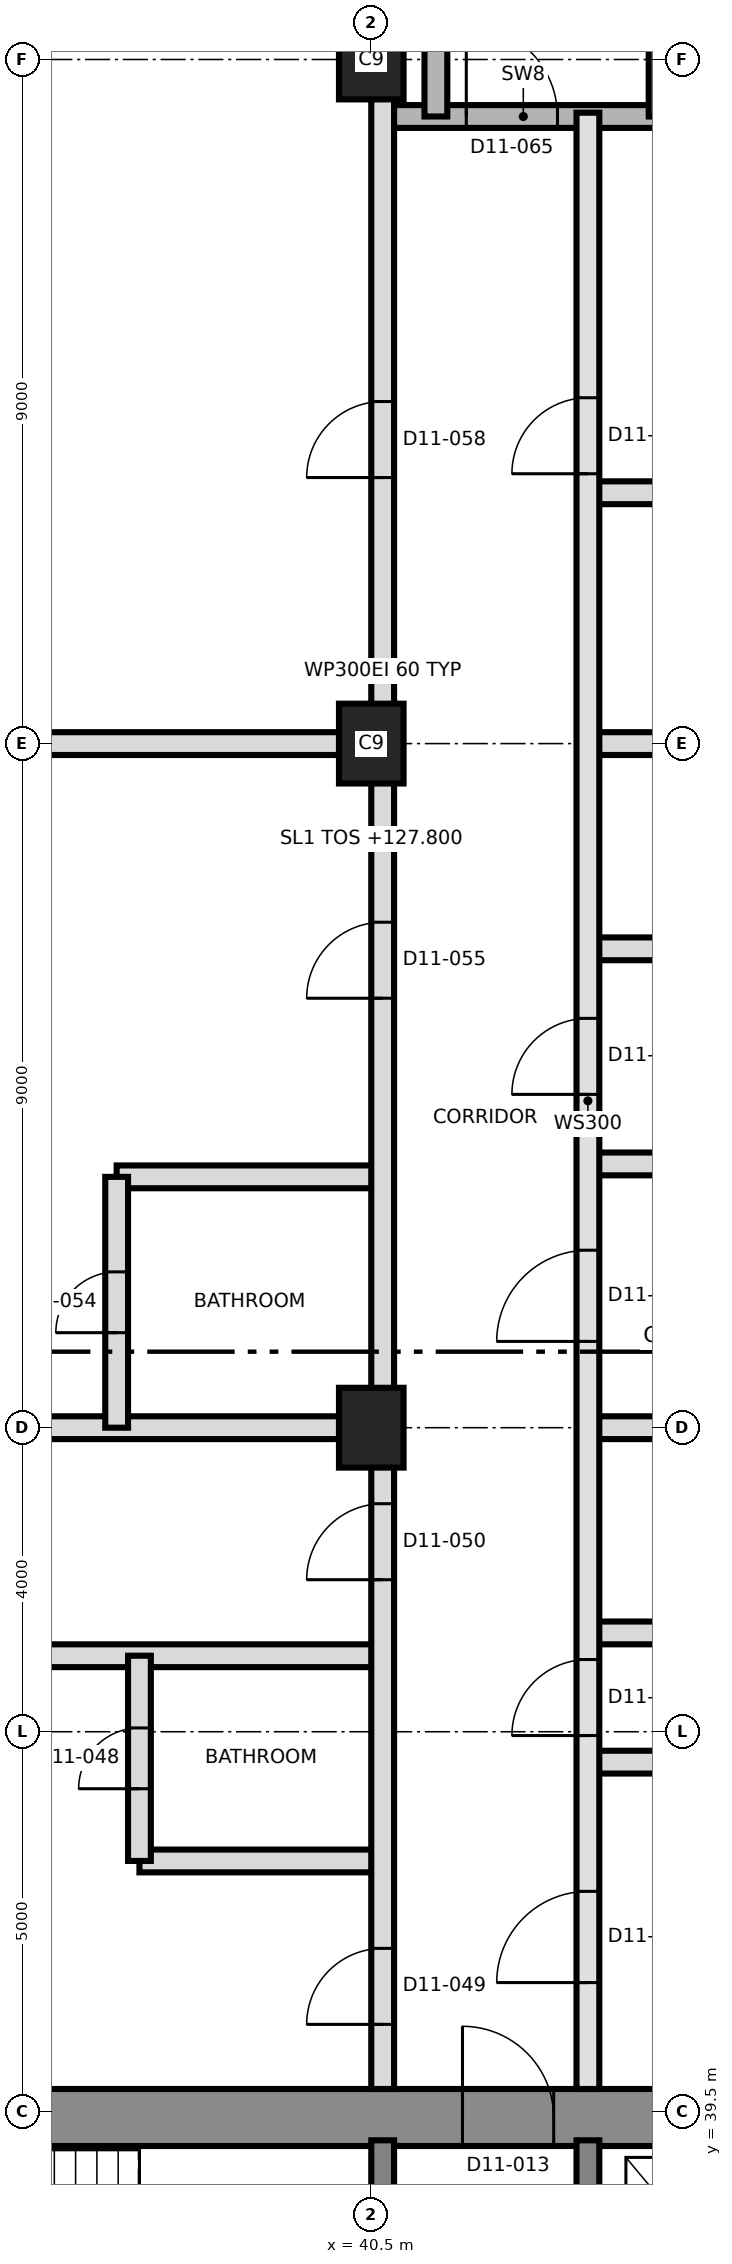
"""IFC4 building model, lengths in metres.
Left out: names, types, materials, properties, quantities, classifications, styles, units other than length and angle.
Written with IfcOpenShell. Run it as: python <this file> out.ifc"""

import sys

from ifc_helpers import new_model, si_unit, direction, frame, frame_2d, origin, origin_2d, place, context, subcontext, project, spatial, rectangle, extrude, element, fill, save


model = new_model("IFC4")
c1 = context("Model", 3, precision=1e-05, world=origin(), true_north=direction((0.0, 1.0)))
c2 = subcontext(c1, "Body", "Model", "MODEL_VIEW")
j1 = project(units=[si_unit("LENGTHUNIT", "METRE"), si_unit("PLANEANGLEUNIT", "RADIAN")], contexts=[c1])
p1 = place(None, origin())
s1 = spatial("IfcSite", under=j1, at=p1, CompositionType="ELEMENT")
p2 = place(p1, origin())
s2 = spatial("IfcBuilding", under=s1, at=p2, CompositionType="ELEMENT")
p3 = place(p2, frame((0.0, 0.0, 127.8)))
s3 = spatial("IfcBuildingStorey", under=s2, at=p3, CompositionType="ELEMENT", Elevation=127.8)
p4 = place(p3, frame((31.125, 39.425, 0.0), z_axis=(0.0, 0.0, 1.0), x_axis=(1.0, 0.0, 0.0)))
e1 = element("IfcWall", 1, at=p4, inside=s3, PredefinedType="SHEAR", context=c2, shape_type="SweptSolid", body=[
    extrude(rectangle(XDim=27.0, YDim=0.75, at=frame_2d((13.5, 0.0))), origin(), (0.0, 0.0, 1.0), 3.7),
])
p5 = place(p4, frame((10.575, 0.0, 0.0)))
e2 = element("IfcOpeningElement", 2, at=p5, cuts=e1, PredefinedType="OPENING", context=c2, shape_type="SweptSolid", body=[
    extrude(rectangle(XDim=1.2, YDim=2.1, at=frame_2d((0.6, 1.05))), frame((0.0, 0.385, 0.0), z_axis=(0.0, -1.0, 0.0), x_axis=(1.0, 0.0, 0.0)), (0.0, 0.0, 1.0), 0.77),
])
for number, where, z_axis, x_axis in (
    (3, (40.65, 33.5, 0.0), (0.0, 0.0, 1.0), (0.0, 1.0, 0.0)),
    (4, (43.35, 33.5, 0.0), (0.0, 0.0, 1.0), (0.0, 1.0, 0.0)),
):
    element("IfcWall", number, at=place(p3, frame(where, z_axis=z_axis, x_axis=x_axis)), inside=s3, PredefinedType="SHEAR", context=c2, shape_type="SweptSolid", body=[
        extrude(rectangle(XDim=5.625, YDim=0.3, at=frame_2d((2.812, 0.0))), origin(), (0.0, 0.0, 1.0), 3.7),
    ])
for number, where, z_axis, x_axis in (
    (5, (40.5, 48.5, 0.0), (0.0, 0.0, 1.0), (0.0, 1.0, 0.0)),
    (6, (40.5, 57.5, 0.0), (0.0, 0.0, 1.0), (0.0, 1.0, 0.0)),
    (7, (40.5, 66.5, 0.0), (0.0, 0.0, 1.0), (0.0, 1.0, 0.0)),
):
    element("IfcColumn", number, at=place(p3, frame(where, z_axis=z_axis, x_axis=x_axis)), inside=s3, PredefinedType="COLUMN", context=c2, shape_type="SweptSolid", body=[
        extrude(rectangle(XDim=1.05, YDim=0.85, at=origin_2d()), origin(), (0.0, 0.0, 1.0), 3.7),
    ])
p6 = place(p3, frame((37.45, 42.8, 0.0), z_axis=(0.0, 0.0, 1.0), x_axis=(1.0, 0.0, 0.0)))
e8 = element("IfcWall", 8, at=p6, inside=s3, PredefinedType="PARTITIONING", context=c2, shape_type="SweptSolid", body=[
    extrude(rectangle(XDim=3.2, YDim=0.3, at=frame_2d((1.6, 0.0))), origin(), (0.0, 0.0, 1.0), 3.4),
])
p7 = place(p3, frame((43.35, 44.1, 0.0), z_axis=(0.0, 0.0, 1.0), x_axis=(1.0, 0.0, 0.0)))
e9 = element("IfcWall", 9, at=p7, inside=s3, PredefinedType="PARTITIONING", context=c2, shape_type="SweptSolid", body=[
    extrude(rectangle(XDim=8.032, YDim=0.3, at=frame_2d((4.016, 0.0))), origin(), (0.0, 0.0, 1.0), 3.4),
])
p8 = place(p3, frame((30.135, 45.5, 0.0), z_axis=(0.0, 0.0, 1.0), x_axis=(1.0, 0.0, 0.0)))
e10 = element("IfcWall", 10, at=p8, inside=s3, PredefinedType="PARTITIONING", context=c2, shape_type="SweptSolid", body=[
    extrude(rectangle(XDim=10.515, YDim=0.3, at=frame_2d((5.257, 0.0))), origin(), (0.0, 0.0, 1.0), 3.4),
])
p9 = place(p3, frame((43.35, 45.8, 0.0), z_axis=(0.0, 0.0, 1.0), x_axis=(1.0, 0.0, 0.0)))
e11 = element("IfcWall", 11, at=p9, inside=s3, PredefinedType="PARTITIONING", context=c2, shape_type="SweptSolid", body=[
    extrude(rectangle(XDim=3.2, YDim=0.3, at=frame_2d((1.6, 0.0))), origin(), (0.0, 0.0, 1.0), 3.4),
])
p10 = place(p3, frame((30.135, 48.5, 0.0), z_axis=(0.0, 0.0, 1.0), x_axis=(1.0, 0.0, 0.0)))
e12 = element("IfcWall", 12, at=p10, inside=s3, PredefinedType="PARTITIONING", context=c2, shape_type="SweptSolid", body=[
    extrude(rectangle(XDim=10.515, YDim=0.3, at=frame_2d((5.257, 0.0))), origin(), (0.0, 0.0, 1.0), 3.4),
])
p11 = place(p3, frame((43.35, 48.5, 0.0), z_axis=(0.0, 0.0, 1.0), x_axis=(1.0, 0.0, 0.0)))
e13 = element("IfcWall", 13, at=p11, inside=s3, PredefinedType="PARTITIONING", context=c2, shape_type="SweptSolid", body=[
    extrude(rectangle(XDim=7.695, YDim=0.3, at=frame_2d((3.847, 0.0))), origin(), (0.0, 0.0, 1.0), 3.4),
])
p12 = place(p3, frame((37.15, 51.8, 0.0), z_axis=(0.0, 0.0, 1.0), x_axis=(1.0, 0.0, 0.0)))
e14 = element("IfcWall", 14, at=p12, inside=s3, PredefinedType="PARTITIONING", context=c2, shape_type="SweptSolid", body=[
    extrude(rectangle(XDim=3.5, YDim=0.3, at=frame_2d((1.75, 0.0))), origin(), (0.0, 0.0, 1.0), 3.4),
])
p13 = place(p3, frame((43.35, 51.97, 0.0), z_axis=(0.0, 0.0, 1.0), x_axis=(1.0, 0.0, 0.0)))
e15 = element("IfcWall", 15, at=p13, inside=s3, PredefinedType="PARTITIONING", context=c2, shape_type="SweptSolid", body=[
    extrude(rectangle(XDim=7.655, YDim=0.3, at=frame_2d((3.827, 0.0))), origin(), (0.0, 0.0, 1.0), 3.4),
])
p14 = place(p3, frame((43.35, 54.8, 0.0), z_axis=(0.0, 0.0, 1.0), x_axis=(1.0, 0.0, 0.0)))
e16 = element("IfcWall", 16, at=p14, inside=s3, PredefinedType="PARTITIONING", context=c2, shape_type="SweptSolid", body=[
    extrude(rectangle(XDim=3.2, YDim=0.3, at=frame_2d((1.6, 0.0))), origin(), (0.0, 0.0, 1.0), 3.4),
])
p15 = place(p3, frame((30.135, 57.5, 0.0), z_axis=(0.0, 0.0, 1.0), x_axis=(1.0, 0.0, 0.0)))
e17 = element("IfcWall", 17, at=p15, inside=s3, PredefinedType="PARTITIONING", context=c2, shape_type="SweptSolid", body=[
    extrude(rectangle(XDim=10.515, YDim=0.3, at=frame_2d((5.257, 0.0))), origin(), (0.0, 0.0, 1.0), 3.4),
])
p16 = place(p3, frame((43.35, 57.5, 0.0), z_axis=(0.0, 0.0, 1.0), x_axis=(1.0, 0.0, 0.0)))
e18 = element("IfcWall", 18, at=p16, inside=s3, PredefinedType="PARTITIONING", context=c2, shape_type="SweptSolid", body=[
    extrude(rectangle(XDim=7.695, YDim=0.3, at=frame_2d((3.847, 0.0))), origin(), (0.0, 0.0, 1.0), 3.4),
])
p17 = place(p3, frame((43.35, 60.8, 0.0), z_axis=(0.0, 0.0, 1.0), x_axis=(1.0, 0.0, 0.0)))
e19 = element("IfcWall", 19, at=p17, inside=s3, PredefinedType="PARTITIONING", context=c2, shape_type="SweptSolid", body=[
    extrude(rectangle(XDim=3.5, YDim=0.3, at=frame_2d((1.75, 0.0))), origin(), (0.0, 0.0, 1.0), 3.4),
])
p18 = place(p3, frame((40.65, 65.75, 0.0), z_axis=(0.0, 0.0, 1.0), x_axis=(1.0, 0.0, 0.0)))
e20 = element("IfcWall", 20, at=p18, inside=s3, PredefinedType="SHEAR", context=c2, shape_type="SweptSolid", body=[
    extrude(rectangle(XDim=3.7, YDim=0.3, at=frame_2d((1.85, 0.0))), origin(), (0.0, 0.0, 1.0), 3.4),
])
p19 = place(p18, frame((1.1, 0.0, 0.0)))
e21 = element("IfcOpeningElement", 21, at=p19, cuts=e20, PredefinedType="OPENING", context=c2, shape_type="SweptSolid", body=[
    extrude(rectangle(XDim=1.2, YDim=2.1, at=frame_2d((0.6, 1.05))), frame((0.0, 0.16, 0.0), z_axis=(0.0, -1.0, 0.0), x_axis=(1.0, 0.0, 0.0)), (0.0, 0.0, 1.0), 0.32),
])
p20 = place(p3, frame((37.15, 48.5, 0.0), z_axis=(0.0, 0.0, 1.0), x_axis=(0.0, 1.0, 0.0)))
e22 = element("IfcWall", 22, at=p20, inside=s3, PredefinedType="PARTITIONING", context=c2, shape_type="SweptSolid", body=[
    extrude(rectangle(XDim=3.3, YDim=0.3, at=frame_2d((1.65, 0.0))), origin(), (0.0, 0.0, 1.0), 3.4),
])
p21 = place(p20, frame((1.25, 0.0, 0.0)))
e23 = element("IfcOpeningElement", 23, at=p21, cuts=e22, PredefinedType="OPENING", context=c2, shape_type="SweptSolid", body=[
    extrude(rectangle(XDim=0.8, YDim=2.1, at=frame_2d((0.4, 1.05))), frame((0.0, 0.16, 0.0), z_axis=(0.0, -1.0, 0.0), x_axis=(1.0, 0.0, 0.0)), (0.0, 0.0, 1.0), 0.32),
])
p22 = place(p3, frame((37.45, 42.8, 0.0), z_axis=(0.0, 0.0, 1.0), x_axis=(0.0, 1.0, 0.0)))
e24 = element("IfcWall", 24, at=p22, inside=s3, PredefinedType="PARTITIONING", context=c2, shape_type="SweptSolid", body=[
    extrude(rectangle(XDim=2.7, YDim=0.3, at=frame_2d((1.35, 0.0))), origin(), (0.0, 0.0, 1.0), 3.4),
])
p23 = place(p22, frame((0.95, 0.0, 0.0)))
e25 = element("IfcOpeningElement", 25, at=p23, cuts=e24, PredefinedType="OPENING", context=c2, shape_type="SweptSolid", body=[
    extrude(rectangle(XDim=0.8, YDim=2.1, at=frame_2d((0.4, 1.05))), frame((0.0, 0.16, 0.0), z_axis=(0.0, -1.0, 0.0), x_axis=(1.0, 0.0, 0.0)), (0.0, 0.0, 1.0), 0.32),
])
p24 = place(p3, frame((40.65, 39.8, 0.0), z_axis=(0.0, 0.0, 1.0), x_axis=(0.0, 1.0, 0.0)))
e26 = element("IfcWall", 26, at=p24, inside=s3, PredefinedType="PARTITIONING", context=c2, shape_type="SweptSolid", body=[
    extrude(rectangle(XDim=37.305, YDim=0.3, at=frame_2d((18.652, 0.0))), origin(), (0.0, 0.0, 1.0), 3.4),
])
p25 = place(p24, frame((0.85, 0.0, 0.0)))
e27 = element("IfcOpeningElement", 27, at=p25, cuts=e26, PredefinedType="OPENING", context=c2, shape_type="SweptSolid", body=[
    extrude(rectangle(XDim=1.0, YDim=2.1, at=frame_2d((0.5, 1.05))), frame((0.0, 0.16, 0.0), z_axis=(0.0, -1.0, 0.0), x_axis=(1.0, 0.0, 0.0)), (0.0, 0.0, 1.0), 0.32),
])
p26 = place(p24, frame((6.7, 0.0, 0.0)))
e28 = element("IfcOpeningElement", 28, at=p26, cuts=e26, PredefinedType="OPENING", context=c2, shape_type="SweptSolid", body=[
    extrude(rectangle(XDim=1.0, YDim=2.1, at=frame_2d((0.5, 1.05))), frame((0.0, 0.16, 0.0), z_axis=(0.0, -1.0, 0.0), x_axis=(1.0, 0.0, 0.0)), (0.0, 0.0, 1.0), 0.32),
])
p27 = place(p24, frame((14.35, 0.0, 0.0)))
e29 = element("IfcOpeningElement", 29, at=p27, cuts=e26, PredefinedType="OPENING", context=c2, shape_type="SweptSolid", body=[
    extrude(rectangle(XDim=1.0, YDim=2.4, at=frame_2d((0.5, 1.2))), frame((0.0, 0.16, 0.0), z_axis=(0.0, -1.0, 0.0), x_axis=(1.0, 0.0, 0.0)), (0.0, 0.0, 1.0), 0.32),
])
p28 = place(p24, frame((21.2, 0.0, 0.0)))
e30 = element("IfcOpeningElement", 30, at=p28, cuts=e26, PredefinedType="OPENING", context=c2, shape_type="SweptSolid", body=[
    extrude(rectangle(XDim=1.0, YDim=2.4, at=frame_2d((0.5, 1.2))), frame((0.0, 0.16, 0.0), z_axis=(0.0, -1.0, 0.0), x_axis=(1.0, 0.0, 0.0)), (0.0, 0.0, 1.0), 0.32),
])
p29 = place(p3, frame((41.35, 65.75, 0.0), z_axis=(0.0, 0.0, 1.0), x_axis=(0.0, 1.0, 0.0)))
e31 = element("IfcWall", 31, at=p29, inside=s3, PredefinedType="SHEAR", context=c2, shape_type="SweptSolid", body=[
    extrude(rectangle(XDim=8.85, YDim=0.3, at=frame_2d((4.425, 0.0))), origin(), (0.0, 0.0, 1.0), 3.4),
])
p30 = place(p3, frame((43.35, 39.8, 0.0), z_axis=(0.0, 0.0, 1.0), x_axis=(0.0, 1.0, 0.0)))
e32 = element("IfcWall", 32, at=p30, inside=s3, PredefinedType="SOLIDWALL", context=c2, shape_type="SweptSolid", body=[
    extrude(rectangle(XDim=26.0, YDim=0.3, at=frame_2d((13.0, 0.0))), origin(), (0.0, 0.0, 1.0), 3.4),
])
p31 = place(p30, frame((1.4, 0.0, 0.0)))
e33 = element("IfcOpeningElement", 33, at=p31, cuts=e32, PredefinedType="OPENING", context=c2, shape_type="SweptSolid", body=[
    extrude(rectangle(XDim=1.2, YDim=2.1, at=frame_2d((0.6, 1.05))), frame((0.0, 0.16, 0.0), z_axis=(0.0, -1.0, 0.0), x_axis=(1.0, 0.0, 0.0)), (0.0, 0.0, 1.0), 0.32),
])
p32 = place(p30, frame((4.65, 0.0, 0.0)))
e34 = element("IfcOpeningElement", 34, at=p32, cuts=e32, PredefinedType="OPENING", context=c2, shape_type="SweptSolid", body=[
    extrude(rectangle(XDim=1.0, YDim=2.1, at=frame_2d((0.5, 1.05))), frame((0.0, 0.16, 0.0), z_axis=(0.0, -1.0, 0.0), x_axis=(1.0, 0.0, 0.0)), (0.0, 0.0, 1.0), 0.32),
])
p33 = place(p30, frame((9.835, 0.0, 0.0)))
e35 = element("IfcOpeningElement", 35, at=p33, cuts=e32, PredefinedType="OPENING", context=c2, shape_type="SweptSolid", body=[
    extrude(rectangle(XDim=1.2, YDim=2.1, at=frame_2d((0.6, 1.05))), frame((0.0, 0.16, 0.0), z_axis=(0.0, -1.0, 0.0), x_axis=(1.0, 0.0, 0.0)), (0.0, 0.0, 1.0), 0.32),
])
p34 = place(p30, frame((13.085, 0.0, 0.0)))
e36 = element("IfcOpeningElement", 36, at=p34, cuts=e32, PredefinedType="OPENING", context=c2, shape_type="SweptSolid", body=[
    extrude(rectangle(XDim=1.0, YDim=2.1, at=frame_2d((0.5, 1.05))), frame((0.0, 0.16, 0.0), z_axis=(0.0, -1.0, 0.0), x_axis=(1.0, 0.0, 0.0)), (0.0, 0.0, 1.0), 0.32),
])
p35 = place(p30, frame((21.25, 0.0, 0.0)))
e37 = element("IfcOpeningElement", 37, at=p35, cuts=e32, PredefinedType="OPENING", context=c2, shape_type="SweptSolid", body=[
    extrude(rectangle(XDim=1.0, YDim=2.4, at=frame_2d((0.5, 1.2))), frame((0.0, 0.16, 0.0), z_axis=(0.0, -1.0, 0.0), x_axis=(1.0, 0.0, 0.0)), (0.0, 0.0, 1.0), 0.32),
])
p36 = place(p3, frame((44.3, 65.75, 0.0), z_axis=(0.0, 0.0, 1.0), x_axis=(0.0, 1.0, 0.0)))
e38 = element("IfcWall", 38, at=p36, inside=s3, PredefinedType="SHEAR", context=c2, shape_type="SweptSolid", body=[
    extrude(rectangle(XDim=8.85, YDim=0.3, at=frame_2d((4.425, 0.0))), origin(), (0.0, 0.0, 1.0), 3.4),
])
p37 = place(p5, origin())
e39 = element("IfcDoor", 39, at=p37, inside=s3, OperationType="SINGLE_SWING_RIGHT", PredefinedType="DOOR", context=c2, shape_type="SweptSolid", body=[
    extrude(rectangle(XDim=1.2, YDim=2.1, at=frame_2d((0.6, 1.05))), frame((0.0, 0.025, 0.0), z_axis=(0.0, -1.0, 0.0), x_axis=(1.0, 0.0, 0.0)), (0.0, 0.0, 1.0), 0.05),
])
fill(e2, e39)
p38 = place(p31, origin())
e40 = element("IfcDoor", 40, at=p38, inside=s3, OperationType="SINGLE_SWING_LEFT", PredefinedType="DOOR", context=c2, shape_type="SweptSolid", body=[
    extrude(rectangle(XDim=1.2, YDim=2.1, at=frame_2d((0.6, 1.05))), frame((0.0, 0.025, 0.0), z_axis=(0.0, -1.0, 0.0), x_axis=(1.0, 0.0, 0.0)), (0.0, 0.0, 1.0), 0.05),
])
fill(e33, e40)
p39 = place(p32, origin())
e41 = element("IfcDoor", 41, at=p39, inside=s3, OperationType="SINGLE_SWING_LEFT", PredefinedType="DOOR", context=c2, shape_type="SweptSolid", body=[
    extrude(rectangle(XDim=1.0, YDim=2.1, at=frame_2d((0.5, 1.05))), frame((0.0, 0.025, 0.0), z_axis=(0.0, -1.0, 0.0), x_axis=(1.0, 0.0, 0.0)), (0.0, 0.0, 1.0), 0.05),
])
fill(e34, e41)
p40 = place(p23, origin())
e42 = element("IfcDoor", 42, at=p40, inside=s3, OperationType="SINGLE_SWING_LEFT", PredefinedType="DOOR", context=c2, shape_type="SweptSolid", body=[
    extrude(rectangle(XDim=0.8, YDim=2.1, at=frame_2d((0.4, 1.05))), frame((0.0, 0.025, 0.0), z_axis=(0.0, -1.0, 0.0), x_axis=(1.0, 0.0, 0.0)), (0.0, 0.0, 1.0), 0.05),
])
fill(e25, e42)
p41 = place(p25, origin())
e43 = element("IfcDoor", 43, at=p41, inside=s3, OperationType="SINGLE_SWING_LEFT", PredefinedType="DOOR", context=c2, shape_type="SweptSolid", body=[
    extrude(rectangle(XDim=1.0, YDim=2.1, at=frame_2d((0.5, 1.05))), frame((0.0, 0.025, 0.0), z_axis=(0.0, -1.0, 0.0), x_axis=(1.0, 0.0, 0.0)), (0.0, 0.0, 1.0), 0.05),
])
fill(e27, e43)
p42 = place(p26, origin())
e44 = element("IfcDoor", 44, at=p42, inside=s3, OperationType="SINGLE_SWING_RIGHT", PredefinedType="DOOR", context=c2, shape_type="SweptSolid", body=[
    extrude(rectangle(XDim=1.0, YDim=2.1, at=frame_2d((0.5, 1.05))), frame((0.0, 0.025, 0.0), z_axis=(0.0, -1.0, 0.0), x_axis=(1.0, 0.0, 0.0)), (0.0, 0.0, 1.0), 0.05),
])
fill(e28, e44)
p43 = place(p33, origin())
e45 = element("IfcDoor", 45, at=p43, inside=s3, OperationType="SINGLE_SWING_LEFT", PredefinedType="DOOR", context=c2, shape_type="SweptSolid", body=[
    extrude(rectangle(XDim=1.2, YDim=2.1, at=frame_2d((0.6, 1.05))), frame((0.0, 0.025, 0.0), z_axis=(0.0, -1.0, 0.0), x_axis=(1.0, 0.0, 0.0)), (0.0, 0.0, 1.0), 0.05),
])
fill(e35, e45)
p44 = place(p34, origin())
e46 = element("IfcDoor", 46, at=p44, inside=s3, OperationType="SINGLE_SWING_LEFT", PredefinedType="DOOR", context=c2, shape_type="SweptSolid", body=[
    extrude(rectangle(XDim=1.0, YDim=2.1, at=frame_2d((0.5, 1.05))), frame((0.0, 0.025, 0.0), z_axis=(0.0, -1.0, 0.0), x_axis=(1.0, 0.0, 0.0)), (0.0, 0.0, 1.0), 0.05),
])
fill(e36, e46)
p45 = place(p21, origin())
e47 = element("IfcDoor", 47, at=p45, inside=s3, OperationType="SINGLE_SWING_LEFT", PredefinedType="DOOR", context=c2, shape_type="SweptSolid", body=[
    extrude(rectangle(XDim=0.8, YDim=2.1, at=frame_2d((0.4, 1.05))), frame((0.0, 0.025, 0.0), z_axis=(0.0, -1.0, 0.0), x_axis=(1.0, 0.0, 0.0)), (0.0, 0.0, 1.0), 0.05),
])
fill(e23, e47)
p46 = place(p27, origin())
e48 = element("IfcDoor", 48, at=p46, inside=s3, OperationType="SINGLE_SWING_LEFT", PredefinedType="DOOR", context=c2, shape_type="SweptSolid", body=[
    extrude(rectangle(XDim=1.0, YDim=2.4, at=frame_2d((0.5, 1.2))), frame((0.0, 0.025, 0.0), z_axis=(0.0, -1.0, 0.0), x_axis=(1.0, 0.0, 0.0)), (0.0, 0.0, 1.0), 0.05),
])
fill(e29, e48)
p47 = place(p35, origin())
e49 = element("IfcDoor", 49, at=p47, inside=s3, OperationType="SINGLE_SWING_RIGHT", PredefinedType="DOOR", context=c2, shape_type="SweptSolid", body=[
    extrude(rectangle(XDim=1.0, YDim=2.4, at=frame_2d((0.5, 1.2))), frame((0.0, 0.025, 0.0), z_axis=(0.0, -1.0, 0.0), x_axis=(1.0, 0.0, 0.0)), (0.0, 0.0, 1.0), 0.05),
])
fill(e37, e49)
p48 = place(p28, origin())
e50 = element("IfcDoor", 50, at=p48, inside=s3, OperationType="SINGLE_SWING_LEFT", PredefinedType="DOOR", context=c2, shape_type="SweptSolid", body=[
    extrude(rectangle(XDim=1.0, YDim=2.4, at=frame_2d((0.5, 1.2))), frame((0.0, 0.025, 0.0), z_axis=(0.0, -1.0, 0.0), x_axis=(1.0, 0.0, 0.0)), (0.0, 0.0, 1.0), 0.05),
])
fill(e30, e50)
p49 = place(p19, origin())
e51 = element("IfcDoor", 51, at=p49, inside=s3, OperationType="SINGLE_SWING_RIGHT", PredefinedType="DOOR", context=c2, shape_type="SweptSolid", body=[
    extrude(rectangle(XDim=1.2, YDim=2.1, at=frame_2d((0.6, 1.05))), frame((0.0, 0.025, 0.0), z_axis=(0.0, -1.0, 0.0), x_axis=(1.0, 0.0, 0.0)), (0.0, 0.0, 1.0), 0.05),
])
fill(e21, e51)
save(model, sys.argv[1])
